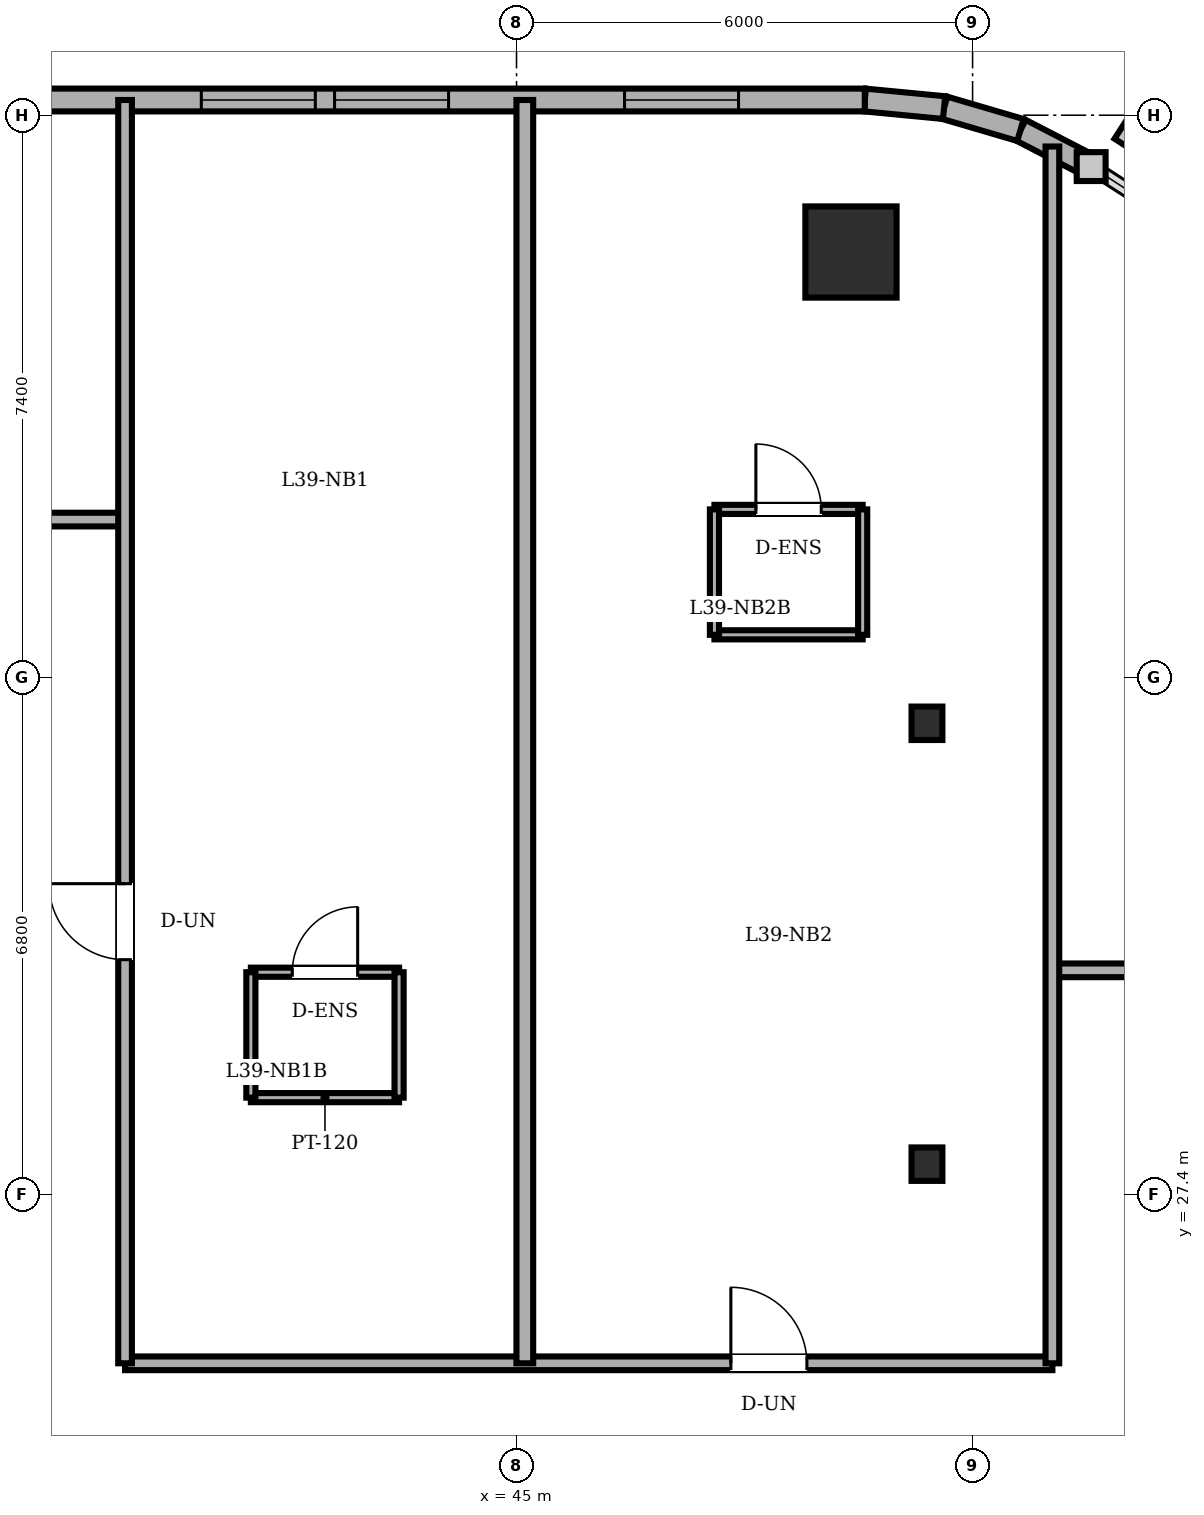
"""IFC4 building model, lengths in metres.
Left out: names, types, materials, properties, quantities, classifications, styles, units other than length and angle.
Written with IfcOpenShell. Run it as: python <this file> out.ifc"""

import sys

from ifc_helpers import new_model, si_unit, direction, frame, frame_2d, origin, origin_2d, place, context, subcontext, project, spatial, rectangle, circle, i_section, extrude, element, fill, save


model = new_model("IFC4")
c1 = context("Model", 3, precision=1e-05, world=origin(), true_north=direction((0.0, 1.0)))
c2 = subcontext(c1, "Body", "Model", "MODEL_VIEW")
j1 = project(units=[si_unit("LENGTHUNIT", "METRE"), si_unit("PLANEANGLEUNIT", "RADIAN")], contexts=[c1])
p1 = place(None, origin())
s1 = spatial("IfcSite", under=j1, at=p1, CompositionType="ELEMENT")
p2 = place(p1, origin())
s2 = spatial("IfcBuilding", under=s1, at=p2, CompositionType="ELEMENT")
p3 = place(p2, frame((0.0, 0.0, 151.0)))
s3 = spatial("IfcBuildingStorey", under=s2, at=p3, CompositionType="ELEMENT", Elevation=151.0)
p4 = place(p3, frame((49.4, 39.8, 0.0), z_axis=(0.0, 0.0, 1.0), x_axis=(1.0, 0.0, 0.0)))
e1 = element("IfcColumn", 1, at=p4, inside=s3, PredefinedType="COLUMN", context=c2, shape_type="SweptSolid", body=[
    extrude(circle(Radius=0.6, at=origin_2d()), origin(), (0.0, 0.0, 1.0), 3.6),
])
for number, where, z_axis, x_axis in (
    (2, (50.4, 27.8, 0.0), (0.0, 0.0, 1.0), (1.0, 0.0, 0.0)),
    (3, (50.4, 33.6, 0.0), (0.0, 0.0, 1.0), (1.0, 0.0, 0.0)),
):
    element("IfcColumn", number, at=place(p3, frame(where, z_axis=z_axis, x_axis=x_axis)), inside=s3, PredefinedType="COLUMN", context=c2, shape_type="SweptSolid", body=[
        extrude(i_section(OverallWidth=0.406, OverallDepth=0.44, WebThickness=0.024, FlangeThickness=0.039, FilletRadius=0.015, at=origin_2d()), origin(), (0.0, 0.0, 1.0), 3.6),
    ])
p5 = place(p3, frame((52.56, 40.924, 0.0), z_axis=(0.0, 0.0, 1.0), x_axis=(-0.888283247196, 0.459296062198, 0.0)))
e4 = element("IfcWall", 4, at=p5, inside=s3, PredefinedType="SOLIDWALL", context=c2, shape_type="SweptSolid", body=[
    extrude(rectangle(XDim=1.047, YDim=0.3, at=frame_2d((0.523, 0.0))), origin(), (0.0, 0.0, 1.0), 3.4),
])
p6 = place(p3, frame((51.63, 41.405, 0.0), z_axis=(0.0, 0.0, 1.0), x_axis=(-0.959528674476, 0.281610942363, 0.0)))
e5 = element("IfcWall", 5, at=p6, inside=s3, PredefinedType="SOLIDWALL", context=c2, shape_type="SweptSolid", body=[
    extrude(rectangle(XDim=1.047, YDim=0.3, at=frame_2d((0.524, 0.0))), origin(), (0.0, 0.0, 1.0), 3.4),
])
p7 = place(p3, frame((50.625, 41.7, 0.0), z_axis=(0.0, 0.0, 1.0), x_axis=(-0.995426089968, 0.095534807324, 0.0)))
e6 = element("IfcWall", 6, at=p7, inside=s3, PredefinedType="SOLIDWALL", context=c2, shape_type="SweptSolid", body=[
    extrude(rectangle(XDim=1.048, YDim=0.3, at=frame_2d((0.524, 0.0))), origin(), (0.0, 0.0, 1.0), 3.4),
])
p8 = place(p3, frame((49.582, 41.8, 0.0), z_axis=(0.0, 0.0, 1.0), x_axis=(-1.0, 0.0, 0.0)))
e7 = element("IfcWall", 7, at=p8, inside=s3, PredefinedType="SOLIDWALL", context=c2, shape_type="SweptSolid", body=[
    extrude(rectangle(XDim=30.282, YDim=0.3, at=frame_2d((15.141, 0.0))), origin(), (0.0, 0.0, 1.0), 3.4),
])
p9 = place(p8, frame((13.907, 0.0, 0.0)))
e8 = element("IfcOpeningElement", 8, at=p9, cuts=e7, PredefinedType="OPENING", context=c2, shape_type="SweptSolid", body=[
    extrude(rectangle(XDim=0.95, YDim=2.2, at=frame_2d((0.475, 1.1))), frame((0.0, 0.16, 0.0), z_axis=(0.0, -1.0, 0.0), x_axis=(1.0, 0.0, 0.0)), (0.0, 0.0, 1.0), 0.32),
])
p10 = place(p8, frame((1.661, 0.0, 0.85)))
e9 = element("IfcOpeningElement", 9, at=p10, cuts=e7, PredefinedType="OPENING", context=c2, shape_type="SweptSolid", body=[
    extrude(rectangle(XDim=1.5, YDim=1.55, at=frame_2d((0.75, 0.775))), frame((0.0, 0.16, 0.0), z_axis=(0.0, -1.0, 0.0), x_axis=(1.0, 0.0, 0.0)), (0.0, 0.0, 1.0), 0.32),
])
p11 = place(p8, frame((5.476, 0.0, 0.85)))
e10 = element("IfcOpeningElement", 10, at=p11, cuts=e7, PredefinedType="OPENING", context=c2, shape_type="SweptSolid", body=[
    extrude(rectangle(XDim=1.5, YDim=1.55, at=frame_2d((0.75, 0.775))), frame((0.0, 0.16, 0.0), z_axis=(0.0, -1.0, 0.0), x_axis=(1.0, 0.0, 0.0)), (0.0, 0.0, 1.0), 0.32),
])
p12 = place(p8, frame((7.229, 0.0, 0.85)))
e11 = element("IfcOpeningElement", 11, at=p12, cuts=e7, PredefinedType="OPENING", context=c2, shape_type="SweptSolid", body=[
    extrude(rectangle(XDim=1.5, YDim=1.55, at=frame_2d((0.75, 0.775))), frame((0.0, 0.16, 0.0), z_axis=(0.0, -1.0, 0.0), x_axis=(1.0, 0.0, 0.0)), (0.0, 0.0, 1.0), 0.32),
])
p13 = place(p8, frame((11.665, 0.0, 0.85)))
e12 = element("IfcOpeningElement", 12, at=p13, cuts=e7, PredefinedType="OPENING", context=c2, shape_type="SweptSolid", body=[
    extrude(rectangle(XDim=1.5, YDim=1.55, at=frame_2d((0.75, 0.775))), frame((0.0, 0.16, 0.0), z_axis=(0.0, -1.0, 0.0), x_axis=(1.0, 0.0, 0.0)), (0.0, 0.0, 1.0), 0.32),
])
p14 = place(p8, frame((18.932, 0.0, 0.85)))
e13 = element("IfcOpeningElement", 13, at=p14, cuts=e7, PredefinedType="OPENING", context=c2, shape_type="SweptSolid", body=[
    extrude(rectangle(XDim=1.5, YDim=1.55, at=frame_2d((0.75, 0.775))), frame((0.0, 0.16, 0.0), z_axis=(0.0, -1.0, 0.0), x_axis=(1.0, 0.0, 0.0)), (0.0, 0.0, 1.0), 0.32),
])
p15 = place(p8, frame((22.532, 0.0, 0.85)))
e14 = element("IfcOpeningElement", 14, at=p15, cuts=e7, PredefinedType="OPENING", context=c2, shape_type="SweptSolid", body=[
    extrude(rectangle(XDim=1.5, YDim=1.55, at=frame_2d((0.75, 0.775))), frame((0.0, 0.16, 0.0), z_axis=(0.0, -1.0, 0.0), x_axis=(1.0, 0.0, 0.0)), (0.0, 0.0, 1.0), 0.32),
])
p16 = place(p8, frame((25.882, 0.0, 0.85)))
e15 = element("IfcOpeningElement", 15, at=p16, cuts=e7, PredefinedType="OPENING", context=c2, shape_type="SweptSolid", body=[
    extrude(rectangle(XDim=1.5, YDim=1.55, at=frame_2d((0.75, 0.775))), frame((0.0, 0.16, 0.0), z_axis=(0.0, -1.0, 0.0), x_axis=(1.0, 0.0, 0.0)), (0.0, 0.0, 1.0), 0.32),
])
p17 = place(p8, frame((27.532, 0.0, 0.85)))
e16 = element("IfcOpeningElement", 16, at=p17, cuts=e7, PredefinedType="OPENING", context=c2, shape_type="SweptSolid", body=[
    extrude(rectangle(XDim=1.5, YDim=1.55, at=frame_2d((0.75, 0.775))), frame((0.0, 0.16, 0.0), z_axis=(0.0, -1.0, 0.0), x_axis=(1.0, 0.0, 0.0)), (0.0, 0.0, 1.0), 0.32),
])
p18 = place(p3, frame((41.505, 30.325, 0.0), z_axis=(0.0, 0.0, 1.0), x_axis=(1.0, 0.0, 0.0)))
e17 = element("IfcWall", 17, at=p18, inside=s3, PredefinedType="PARTITIONING", context=c2, shape_type="SweptSolid", body=[
    extrude(rectangle(XDim=1.95, YDim=0.12, at=frame_2d((0.975, 0.0))), origin(), (0.0, 0.0, 1.0), 3.4),
])
p19 = place(p18, frame((0.545, 0.0, 0.0)))
e18 = element("IfcOpeningElement", 18, at=p19, cuts=e17, PredefinedType="OPENING", context=c2, shape_type="SweptSolid", body=[
    extrude(rectangle(XDim=0.86, YDim=2.1, at=frame_2d((0.43, 1.05))), frame((0.0, 0.07, 0.0), z_axis=(0.0, -1.0, 0.0), x_axis=(1.0, 0.0, 0.0)), (0.0, 0.0, 1.0), 0.14),
])
p20 = place(p3, frame((43.455, 28.675, 0.0), z_axis=(0.0, 0.0, 1.0), x_axis=(-1.0, 0.0, 0.0)))
e19 = element("IfcWall", 19, at=p20, inside=s3, PredefinedType="PARTITIONING", context=c2, shape_type="SweptSolid", body=[
    extrude(rectangle(XDim=1.95, YDim=0.12, at=frame_2d((0.975, 0.0))), origin(), (0.0, 0.0, 1.0), 3.4),
])
for number, where, z_axis, x_axis in (
    (20, (41.505, 30.325, 0.0), (0.0, 0.0, 1.0), (0.0, -1.0, 0.0)),
    (21, (43.455, 28.675, 0.0), (0.0, 0.0, 1.0), (0.0, 1.0, 0.0)),
):
    element("IfcWall", number, at=place(p3, frame(where, z_axis=z_axis, x_axis=x_axis)), inside=s3, PredefinedType="PARTITIONING", context=c2, shape_type="SweptSolid", body=[
        extrude(rectangle(XDim=1.65, YDim=0.12, at=frame_2d((0.825, 0.0))), origin(), (0.0, 0.0, 1.0), 3.4),
    ])
p21 = place(p3, frame((47.604, 36.414, 0.0), z_axis=(0.0, 0.0, 1.0), x_axis=(1.0, 0.0, 0.0)))
e22 = element("IfcWall", 22, at=p21, inside=s3, PredefinedType="PARTITIONING", context=c2, shape_type="SweptSolid", body=[
    extrude(rectangle(XDim=1.95, YDim=0.12, at=frame_2d((0.975, 0.0))), origin(), (0.0, 0.0, 1.0), 3.4),
])
p22 = place(p21, frame((0.545, 0.0, 0.0)))
e23 = element("IfcOpeningElement", 23, at=p22, cuts=e22, PredefinedType="OPENING", context=c2, shape_type="SweptSolid", body=[
    extrude(rectangle(XDim=0.86, YDim=2.1, at=frame_2d((0.43, 1.05))), frame((0.0, 0.07, 0.0), z_axis=(0.0, -1.0, 0.0), x_axis=(1.0, 0.0, 0.0)), (0.0, 0.0, 1.0), 0.14),
])
p23 = place(p3, frame((49.554, 34.764, 0.0), z_axis=(0.0, 0.0, 1.0), x_axis=(-1.0, 0.0, 0.0)))
e24 = element("IfcWall", 24, at=p23, inside=s3, PredefinedType="PARTITIONING", context=c2, shape_type="SweptSolid", body=[
    extrude(rectangle(XDim=1.95, YDim=0.12, at=frame_2d((0.975, 0.0))), origin(), (0.0, 0.0, 1.0), 3.4),
])
for number, where, z_axis, x_axis in (
    (25, (47.604, 36.414, 0.0), (0.0, 0.0, 1.0), (0.0, -1.0, 0.0)),
    (26, (49.554, 34.764, 0.0), (0.0, 0.0, 1.0), (0.0, 1.0, 0.0)),
):
    element("IfcWall", number, at=place(p3, frame(where, z_axis=z_axis, x_axis=x_axis)), inside=s3, PredefinedType="PARTITIONING", context=c2, shape_type="SweptSolid", body=[
        extrude(rectangle(XDim=1.65, YDim=0.12, at=frame_2d((0.825, 0.0))), origin(), (0.0, 0.0, 1.0), 3.4),
    ])
p24 = place(p3, frame((39.85, 25.18, 0.0), z_axis=(0.0, 0.0, 1.0), x_axis=(1.0, 0.0, 0.0)))
e27 = element("IfcWall", 27, at=p24, inside=s3, PredefinedType="PARTITIONING", context=c2, shape_type="SweptSolid", body=[
    extrude(rectangle(XDim=12.2, YDim=0.18, at=frame_2d((6.1, 0.0))), origin(), (0.0, 0.0, 1.0), 3.4),
])
p25 = place(p24, frame((7.97, 0.0, 0.0)))
e28 = element("IfcOpeningElement", 28, at=p25, cuts=e27, PredefinedType="OPENING", context=c2, shape_type="SweptSolid", body=[
    extrude(rectangle(XDim=1.0, YDim=2.15, at=frame_2d((0.5, 1.075))), frame((0.0, 0.1, 0.0), z_axis=(0.0, -1.0, 0.0), x_axis=(1.0, 0.0, 0.0)), (0.0, 0.0, 1.0), 0.2),
])
p26 = place(p3, frame((52.05, 30.35, 0.0), z_axis=(0.0, 0.0, 1.0), x_axis=(1.0, 0.0, 0.0)))
e29 = element("IfcWall", 29, at=p26, inside=s3, PredefinedType="PARTITIONING", context=c2, shape_type="SweptSolid", body=[
    extrude(rectangle(XDim=10.95, YDim=0.18, at=frame_2d((5.475, 0.0))), origin(), (0.0, 0.0, 1.0), 3.4),
])
p27 = place(p26, frame((0.975, 0.0, 0.0)))
e30 = element("IfcOpeningElement", 30, at=p27, cuts=e29, PredefinedType="OPENING", context=c2, shape_type="SweptSolid", body=[
    extrude(rectangle(XDim=0.92, YDim=2.1, at=frame_2d((0.46, 1.05))), frame((0.0, 0.1, 0.0), z_axis=(0.0, -1.0, 0.0), x_axis=(1.0, 0.0, 0.0)), (0.0, 0.0, 1.0), 0.2),
])
p28 = place(p3, frame((13.8, 36.28, 0.0), z_axis=(0.0, 0.0, 1.0), x_axis=(1.0, 0.0, 0.0)))
e31 = element("IfcWall", 31, at=p28, inside=s3, PredefinedType="PARTITIONING", context=c2, shape_type="SweptSolid", body=[
    extrude(rectangle(XDim=26.05, YDim=0.18, at=frame_2d((13.025, 0.0))), origin(), (0.0, 0.0, 1.0), 3.4),
])
p29 = place(p28, frame((12.05, 0.0, 0.0)))
e32 = element("IfcOpeningElement", 32, at=p29, cuts=e31, PredefinedType="OPENING", context=c2, shape_type="SweptSolid", body=[
    extrude(rectangle(XDim=0.9, YDim=2.1, at=frame_2d((0.45, 1.05))), frame((0.0, 0.1, 0.0), z_axis=(0.0, -1.0, 0.0), x_axis=(1.0, 0.0, 0.0)), (0.0, 0.0, 1.0), 0.2),
])
p30 = place(p28, frame((15.67, 0.0, 0.0)))
e33 = element("IfcOpeningElement", 33, at=p30, cuts=e31, PredefinedType="OPENING", context=c2, shape_type="SweptSolid", body=[
    extrude(rectangle(XDim=0.86, YDim=2.1, at=frame_2d((0.43, 1.05))), frame((0.0, 0.1, 0.0), z_axis=(0.0, -1.0, 0.0), x_axis=(1.0, 0.0, 0.0)), (0.0, 0.0, 1.0), 0.2),
])
p31 = place(p28, frame((5.54, 0.0, 0.0)))
e34 = element("IfcOpeningElement", 34, at=p31, cuts=e31, PredefinedType="OPENING", context=c2, shape_type="SweptSolid", body=[
    extrude(rectangle(XDim=0.92, YDim=2.1, at=frame_2d((0.46, 1.05))), frame((0.0, 0.1, 0.0), z_axis=(0.0, -1.0, 0.0), x_axis=(1.0, 0.0, 0.0)), (0.0, 0.0, 1.0), 0.2),
])
p32 = place(p28, frame((21.305, 0.0, 0.0)))
e35 = element("IfcOpeningElement", 35, at=p32, cuts=e31, PredefinedType="OPENING", context=c2, shape_type="SweptSolid", body=[
    extrude(rectangle(XDim=0.92, YDim=2.1, at=frame_2d((0.46, 1.05))), frame((0.0, 0.1, 0.0), z_axis=(0.0, -1.0, 0.0), x_axis=(1.0, 0.0, 0.0)), (0.0, 0.0, 1.0), 0.2),
])
p33 = place(p3, frame((39.85, 25.18, 0.0), z_axis=(0.0, 0.0, 1.0), x_axis=(0.0, 1.0, 0.0)))
e36 = element("IfcWall", 36, at=p33, inside=s3, PredefinedType="PARTITIONING", context=c2, shape_type="SweptSolid", body=[
    extrude(rectangle(XDim=16.62, YDim=0.18, at=frame_2d((8.31, 0.0))), origin(), (0.0, 0.0, 1.0), 3.4),
])
p34 = place(p33, frame((5.31, 0.0, 0.0)))
e37 = element("IfcOpeningElement", 37, at=p34, cuts=e36, PredefinedType="OPENING", context=c2, shape_type="SweptSolid", body=[
    extrude(rectangle(XDim=1.0, YDim=2.15, at=frame_2d((0.5, 1.075))), frame((0.0, 0.1, 0.0), z_axis=(0.0, -1.0, 0.0), x_axis=(1.0, 0.0, 0.0)), (0.0, 0.0, 1.0), 0.2),
])
p35 = place(p3, frame((45.109, 25.18, 0.0), z_axis=(0.0, 0.0, 1.0), x_axis=(0.0, 1.0, 0.0)))
e38 = element("IfcWall", 38, at=p35, inside=s3, PredefinedType="PARTITIONING", context=c2, shape_type="SweptSolid", body=[
    extrude(rectangle(XDim=16.62, YDim=0.22, at=frame_2d((8.31, 0.0))), origin(), (0.0, 0.0, 1.0), 3.4),
])
p36 = place(p3, frame((52.05, 25.18, 0.0), z_axis=(0.0, 0.0, 1.0), x_axis=(0.0, 1.0, 0.0)))
e39 = element("IfcWall", 39, at=p36, inside=s3, PredefinedType="PARTITIONING", context=c2, shape_type="SweptSolid", body=[
    extrude(rectangle(XDim=16.008, YDim=0.18, at=frame_2d((8.004, 0.0))), origin(), (0.0, 0.0, 1.0), 3.4),
])
p37 = place(p10, origin())
e40 = element("IfcWindow", 40, at=p37, inside=s3, PartitioningType="DOUBLE_PANEL_VERTICAL", PredefinedType="WINDOW", context=c2, shape_type="SweptSolid", body=[
    extrude(rectangle(XDim=1.5, YDim=1.55, at=frame_2d((0.75, 0.775))), frame((0.0, 0.03, 0.0), z_axis=(0.0, -1.0, 0.0), x_axis=(1.0, 0.0, 0.0)), (0.0, 0.0, 1.0), 0.06),
])
fill(e9, e40)
p38 = place(p11, origin())
e41 = element("IfcWindow", 41, at=p38, inside=s3, PartitioningType="DOUBLE_PANEL_VERTICAL", PredefinedType="WINDOW", context=c2, shape_type="SweptSolid", body=[
    extrude(rectangle(XDim=1.5, YDim=1.55, at=frame_2d((0.75, 0.775))), frame((0.0, 0.03, 0.0), z_axis=(0.0, -1.0, 0.0), x_axis=(1.0, 0.0, 0.0)), (0.0, 0.0, 1.0), 0.06),
])
fill(e10, e41)
p39 = place(p12, origin())
e42 = element("IfcWindow", 42, at=p39, inside=s3, PartitioningType="DOUBLE_PANEL_VERTICAL", PredefinedType="WINDOW", context=c2, shape_type="SweptSolid", body=[
    extrude(rectangle(XDim=1.5, YDim=1.55, at=frame_2d((0.75, 0.775))), frame((0.0, 0.03, 0.0), z_axis=(0.0, -1.0, 0.0), x_axis=(1.0, 0.0, 0.0)), (0.0, 0.0, 1.0), 0.06),
])
fill(e11, e42)
p40 = place(p19, origin())
e43 = element("IfcDoor", 43, at=p40, inside=s3, OperationType="SINGLE_SWING_RIGHT", PredefinedType="DOOR", context=c2, shape_type="SweptSolid", body=[
    extrude(rectangle(XDim=0.86, YDim=2.1, at=frame_2d((0.43, 1.05))), frame((0.0, 0.025, 0.0), z_axis=(0.0, -1.0, 0.0), x_axis=(1.0, 0.0, 0.0)), (0.0, 0.0, 1.0), 0.05),
])
fill(e18, e43)
p41 = place(p22, origin())
e44 = element("IfcDoor", 44, at=p41, inside=s3, OperationType="SINGLE_SWING_LEFT", PredefinedType="DOOR", context=c2, shape_type="SweptSolid", body=[
    extrude(rectangle(XDim=0.86, YDim=2.1, at=frame_2d((0.43, 1.05))), frame((0.0, 0.025, 0.0), z_axis=(0.0, -1.0, 0.0), x_axis=(1.0, 0.0, 0.0)), (0.0, 0.0, 1.0), 0.05),
])
fill(e23, e44)
p42 = place(p34, origin())
e45 = element("IfcDoor", 45, at=p42, inside=s3, OperationType="SINGLE_SWING_RIGHT", PredefinedType="DOOR", context=c2, shape_type="SweptSolid", body=[
    extrude(rectangle(XDim=1.0, YDim=2.15, at=frame_2d((0.5, 1.075))), frame((0.0, 0.025, 0.0), z_axis=(0.0, -1.0, 0.0), x_axis=(1.0, 0.0, 0.0)), (0.0, 0.0, 1.0), 0.05),
])
fill(e37, e45)
p43 = place(p25, origin())
e46 = element("IfcDoor", 46, at=p43, inside=s3, OperationType="SINGLE_SWING_LEFT", PredefinedType="DOOR", context=c2, shape_type="SweptSolid", body=[
    extrude(rectangle(XDim=1.0, YDim=2.15, at=frame_2d((0.5, 1.075))), frame((0.0, 0.025, 0.0), z_axis=(0.0, -1.0, 0.0), x_axis=(1.0, 0.0, 0.0)), (0.0, 0.0, 1.0), 0.05),
])
fill(e28, e46)
save(model, sys.argv[1])
